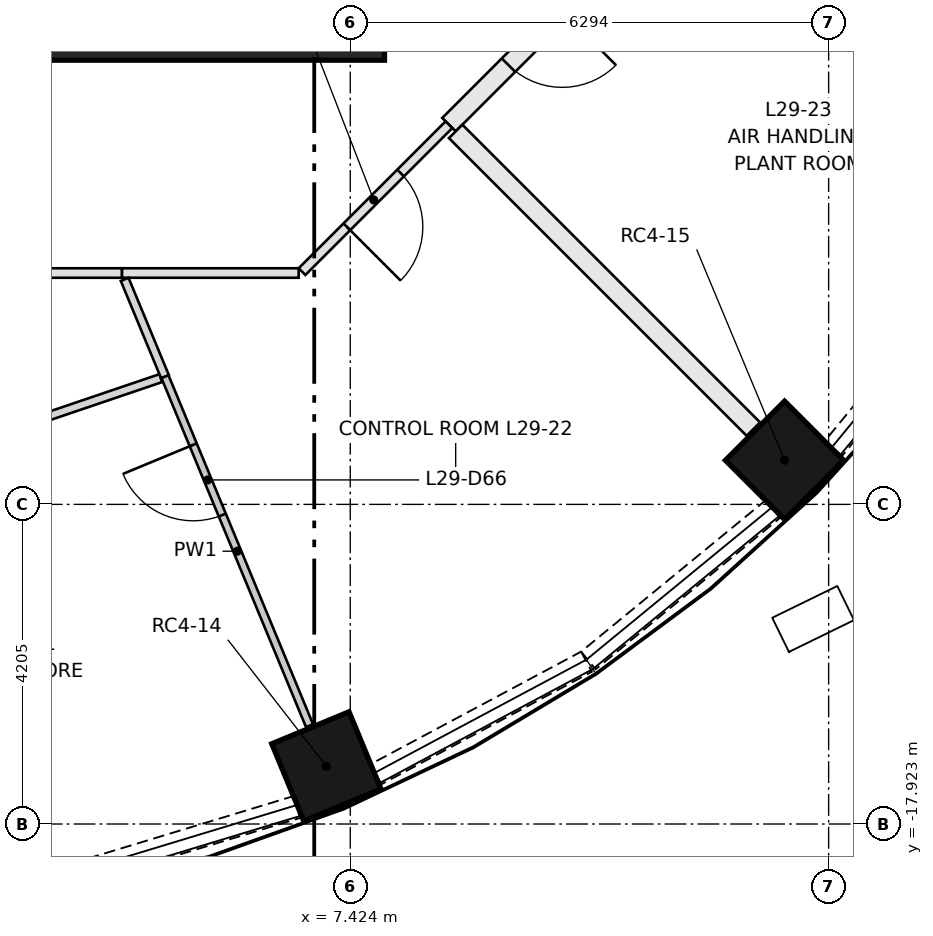
"""IFC4 building model, lengths in metres.
Left out: names, types, materials, properties, quantities, classifications, styles, units other than length and angle.
Written with IfcOpenShell. Run it as: python <this file> out.ifc"""

import sys

from ifc_helpers import new_model, si_unit, direction, frame, frame_2d, origin, origin_2d, place, context, subcontext, project, spatial, rectangle, extrude, element, fill, save


model = new_model("IFC4")
c1 = context("Model", 3, precision=1e-05, world=origin(), true_north=direction((0.0, 1.0)))
c2 = subcontext(c1, "Body", "Model", "MODEL_VIEW")
j1 = project(units=[si_unit("LENGTHUNIT", "METRE"), si_unit("PLANEANGLEUNIT", "RADIAN")], contexts=[c1])
p1 = place(None, origin())
s1 = spatial("IfcSite", under=j1, at=p1, CompositionType="ELEMENT")
p2 = place(p1, origin())
s2 = spatial("IfcBuilding", under=s1, at=p2, CompositionType="ELEMENT")
p3 = place(p2, frame((0.0, 0.0, 112.9)))
s3 = spatial("IfcBuildingStorey", under=s2, at=p3, CompositionType="ELEMENT", Elevation=112.9)
for number, where, z_axis, x_axis in (
    (1, (7.11, -17.166, 0.0), (0.0, 0.0, 1.0), (0.383, -0.924, 0.0)),
    (2, (13.138, -13.138, 0.0), (0.0, 0.0, 1.0), (0.707, -0.707, 0.0)),
):
    element("IfcColumn", number, at=place(p3, frame(where, z_axis=z_axis, x_axis=x_axis)), inside=s3, PredefinedType="COLUMN", context=c2, shape_type="SweptSolid", body=[
        extrude(rectangle(XDim=1.1, YDim=1.1, at=origin_2d()), origin(), (0.0, 0.0, 1.0), 3.65),
    ])
p4 = place(p3, frame((-7.874, -7.499, 0.0), z_axis=(0.0, 0.0, 1.0), x_axis=(1.0, 0.0, 0.0)))
e3 = element("IfcWall", 3, at=p4, inside=s3, PredefinedType="SHEAR", context=c2, shape_type="SweptSolid", body=[
    extrude(rectangle(XDim=15.748, YDim=0.75, at=frame_2d((7.874, 0.0))), origin(), (0.0, 0.0, 1.0), 3.65),
])
p5 = place(p3, frame((3.717, -18.611, 0.0), z_axis=(0.0, 0.0, 1.0), x_axis=(0.956961595403, 0.290214584271, 0.0)))
e4 = element("IfcWall", 4, at=p5, inside=s3, PredefinedType="SOLIDWALL", context=c2, shape_type="SweptSolid", body=[
    extrude(rectangle(XDim=3.139, YDim=0.3, at=frame_2d((1.57, 0.0))), origin(), (0.0, 0.0, 1.0), 0.9),
])
p6 = place(p3, frame((7.763, -17.268, 0.0), z_axis=(0.0, 0.0, 1.0), x_axis=(0.88193278355, 0.471375185282, 0.0)))
e5 = element("IfcWall", 5, at=p6, inside=s3, PredefinedType="SOLIDWALL", context=c2, shape_type="SweptSolid", body=[
    extrude(rectangle(XDim=3.139, YDim=0.3, at=frame_2d((1.57, 0.0))), origin(), (0.0, 0.0, 1.0), 0.9),
])
for number, where, z_axis, x_axis in (
    (6, (10.557, -15.771, 0.0), (0.0, 0.0, 1.0), (0.773, 0.634, 0.0)),
    (7, (13.781, -12.983, 0.0), (0.0, 0.0, 1.0), (0.634, 0.773, 0.0)),
):
    element("IfcWall", number, at=place(p3, frame(where, z_axis=z_axis, x_axis=x_axis)), inside=s3, PredefinedType="SOLIDWALL", context=c2, shape_type="SweptSolid", body=[
        extrude(rectangle(XDim=3.139, YDim=0.3, at=frame_2d((1.569, 0.0))), origin(), (0.0, 0.0, 1.0), 0.9),
    ])
p7 = place(p3, frame((10.637, -6.808, 0.0), z_axis=(0.0, 0.0, 1.0), x_axis=(-0.707151855722, -0.707061703777, 0.0)))
e8 = element("IfcWall", 8, at=p7, inside=s3, PredefinedType="PARTITIONING", context=c2, shape_type="SweptSolid", body=[
    extrude(rectangle(XDim=2.708, YDim=0.25, at=frame_2d((1.354, 0.0))), origin(), (0.0, 0.0, 1.0), 3.3),
])
p8 = place(p7, frame((0.6, 0.0, 0.0)))
e9 = element("IfcOpeningElement", 9, at=p8, cuts=e8, PredefinedType="OPENING", context=c2, shape_type="SweptSolid", body=[
    extrude(rectangle(XDim=1.0, YDim=2.1, at=frame_2d((0.5, 1.05))), frame((0.0, 0.135, 0.0), z_axis=(0.0, -1.0, 0.0), x_axis=(1.0, 0.0, 0.0)), (0.0, 0.0, 1.0), 0.27),
])
p9 = place(p3, frame((4.421, -10.674, 0.0), z_axis=(0.0, 0.0, 1.0), x_axis=(-1.0, 0.0, 0.0)))
e10 = element("IfcWall", 10, at=p9, inside=s3, PredefinedType="PARTITIONING", context=c2, shape_type="SweptSolid", body=[
    extrude(rectangle(XDim=4.359, YDim=0.125, at=frame_2d((2.179, 0.0))), origin(), (0.0, 0.0, 1.0), 3.3),
])
p10 = place(p9, frame((1.7, 0.0, 0.0)))
e11 = element("IfcOpeningElement", 11, at=p10, cuts=e10, PredefinedType="OPENING", context=c2, shape_type="SweptSolid", body=[
    extrude(rectangle(XDim=1.0, YDim=2.1, at=frame_2d((0.5, 1.05))), frame((0.0, 0.073, 0.0), z_axis=(0.0, -1.0, 0.0), x_axis=(1.0, 0.0, 0.0)), (0.0, 0.0, 1.0), 0.145),
])
p11 = place(p3, frame((6.745, -10.674, 0.0), z_axis=(0.0, 0.0, 1.0), x_axis=(-1.0, 0.0, 0.0)))
e12 = element("IfcWall", 12, at=p11, inside=s3, PredefinedType="PARTITIONING", context=c2, shape_type="SweptSolid", body=[
    extrude(rectangle(XDim=2.324, YDim=0.125, at=frame_2d((1.162, 0.0))), origin(), (0.0, 0.0, 1.0), 3.3),
])
p12 = place(p3, frame((8.722, -8.722, 0.0), z_axis=(0.0, 0.0, 1.0), x_axis=(-0.707062130741, -0.707151428813, 0.0)))
e13 = element("IfcWall", 13, at=p12, inside=s3, PredefinedType="PARTITIONING", context=c2, shape_type="SweptSolid", body=[
    extrude(rectangle(XDim=2.734, YDim=0.125, at=frame_2d((1.367, 0.0))), origin(), (0.0, 0.0, 1.0), 3.3),
])
p13 = place(p12, frame((0.9, 0.0, 0.0)))
e14 = element("IfcOpeningElement", 14, at=p13, cuts=e13, PredefinedType="OPENING", context=c2, shape_type="SweptSolid", body=[
    extrude(rectangle(XDim=1.0, YDim=2.1, at=frame_2d((0.5, 1.05))), frame((0.0, 0.073, 0.0), z_axis=(0.0, -1.0, 0.0), x_axis=(1.0, 0.0, 0.0)), (0.0, 0.0, 1.0), 0.145),
])
p14 = place(p3, frame((4.931, -12.057, 0.0), z_axis=(0.0, 0.0, 1.0), x_axis=(-0.946990007889, -0.321263015235, 0.0)))
e15 = element("IfcWall", 15, at=p14, inside=s3, PredefinedType="PARTITIONING", context=c2, shape_type="SweptSolid", body=[
    extrude(rectangle(XDim=1.642, YDim=0.11, at=frame_2d((0.821, 0.0))), origin(), (0.0, 0.0, 1.0), 3.3),
])
p15 = place(p3, frame((4.456, -10.758, 0.0), z_axis=(0.0, 0.0, 1.0), x_axis=(0.382751066095, -0.923851514803, 0.0)))
e16 = element("IfcWall", 16, at=p15, inside=s3, PredefinedType="PARTITIONING", context=c2, shape_type="SweptSolid", body=[
    extrude(rectangle(XDim=1.386, YDim=0.11, at=frame_2d((0.693, 0.0))), origin(), (0.0, 0.0, 1.0), 3.3),
])
p16 = place(p3, frame((6.888, -16.63, 0.0), z_axis=(0.0, 0.0, 1.0), x_axis=(-0.38266126553, 0.923888714003, 0.0)))
e17 = element("IfcWall", 17, at=p16, inside=s3, PredefinedType="PARTITIONING", context=c2, shape_type="SweptSolid", body=[
    extrude(rectangle(XDim=4.97, YDim=0.1, at=frame_2d((2.485, 0.0))), origin(), (0.0, 0.0, 1.0), 3.3),
])
p17 = place(p16, frame((3.0, 0.0, 0.0)))
e18 = element("IfcOpeningElement", 18, at=p17, cuts=e17, PredefinedType="OPENING", context=c2, shape_type="SweptSolid", body=[
    extrude(rectangle(XDim=1.0, YDim=2.1, at=frame_2d((0.5, 1.05))), frame((0.0, 0.06, 0.0), z_axis=(0.0, -1.0, 0.0), x_axis=(1.0, 0.0, 0.0)), (0.0, 0.0, 1.0), 0.12),
])
p18 = place(p3, frame((8.811, -8.811, 0.0), z_axis=(0.0, 0.0, 1.0), x_axis=(0.707106781187, -0.707106781187, 0.0)))
e19 = element("IfcWall", 19, at=p18, inside=s3, PredefinedType="PARTITIONING", context=c2, shape_type="SweptSolid", body=[
    extrude(rectangle(XDim=5.54, YDim=0.25, at=frame_2d((2.77, 0.0))), origin(), (0.0, 0.0, 1.0), 3.3),
])
p19 = place(p8, origin())
e20 = element("IfcDoor", 20, at=p19, inside=s3, OperationType="SINGLE_SWING_LEFT", PredefinedType="DOOR", context=c2, shape_type="SweptSolid", body=[
    extrude(rectangle(XDim=1.0, YDim=2.1, at=frame_2d((0.5, 1.05))), frame((0.0, 0.025, 0.0), z_axis=(0.0, -1.0, 0.0), x_axis=(1.0, 0.0, 0.0)), (0.0, 0.0, 1.0), 0.05),
])
fill(e9, e20)
p20 = place(p13, origin())
e21 = element("IfcDoor", 21, at=p20, inside=s3, OperationType="SINGLE_SWING_RIGHT", PredefinedType="DOOR", context=c2, shape_type="SweptSolid", body=[
    extrude(rectangle(XDim=1.0, YDim=2.1, at=frame_2d((0.5, 1.05))), frame((0.0, 0.025, 0.0), z_axis=(0.0, -1.0, 0.0), x_axis=(1.0, 0.0, 0.0)), (0.0, 0.0, 1.0), 0.05),
])
fill(e14, e21)
p21 = place(p17, origin())
e22 = element("IfcDoor", 22, at=p21, inside=s3, OperationType="SINGLE_SWING_RIGHT", PredefinedType="DOOR", context=c2, shape_type="SweptSolid", body=[
    extrude(rectangle(XDim=1.0, YDim=2.1, at=frame_2d((0.5, 1.05))), frame((0.0, 0.025, 0.0), z_axis=(0.0, -1.0, 0.0), x_axis=(1.0, 0.0, 0.0)), (0.0, 0.0, 1.0), 0.05),
])
fill(e18, e22)
save(model, sys.argv[1])
